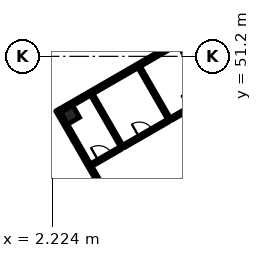
"""IFC4 building model, lengths in metres.
Left out: names, types, materials, properties, quantities, classifications, styles, units other than length and angle.
Written with IfcOpenShell. Run it as: python <this file> out.ifc"""

import sys

from ifc_helpers import new_model, si_unit, direction, frame, frame_2d, origin, origin_2d, place, context, subcontext, project, spatial, rectangle, extrude, element, fill, save


model = new_model("IFC4")
c1 = context("Model", 3, precision=1e-05, world=origin(), true_north=direction((0.0, 1.0)))
c2 = subcontext(c1, "Body", "Model", "MODEL_VIEW")
j1 = project(units=[si_unit("LENGTHUNIT", "METRE"), si_unit("PLANEANGLEUNIT", "RADIAN")], contexts=[c1])
p1 = place(None, origin())
s1 = spatial("IfcSite", under=j1, at=p1, CompositionType="ELEMENT")
p2 = place(p1, origin())
s2 = spatial("IfcBuilding", under=s1, at=p2, CompositionType="ELEMENT")
p3 = place(p2, frame((0.0, 0.0, 16.2)))
s3 = spatial("IfcBuildingStorey", under=s2, at=p3, CompositionType="ELEMENT", Elevation=16.2)
for number, where, z_axis, x_axis in (
    (1, (3.41, 47.349, 0.0), (0.0, 0.0, 1.0), (-0.5, 0.866, 0.0)),
    (2, (11.118, 51.799, 0.0), (0.0, 0.0, 1.0), (-0.5, 0.866, 0.0)),
):
    element("IfcColumn", number, at=place(p3, frame(where, z_axis=z_axis, x_axis=x_axis)), inside=s3, PredefinedType="COLUMN", context=c2, shape_type="SweptSolid", body=[
        extrude(rectangle(XDim=0.9, YDim=0.9, at=origin_2d()), origin(), (0.0, 0.0, 1.0), 5.4),
    ])
p4 = place(p3, frame((6.875, 40.198, 0.0), z_axis=(0.0, 0.0, 1.0), x_axis=(-0.499999331568, 0.866025789703, 0.0)))
e3 = element("IfcWall", 3, at=p4, inside=s3, PredefinedType="SOLIDWALL", context=c2, shape_type="SweptSolid", body=[
    extrude(rectangle(XDim=8.625, YDim=0.25, at=frame_2d((4.312, 0.0))), origin(), (0.0, 0.0, 1.0), 5.0),
])
p5 = place(p3, frame((2.733, 47.622, 0.0), z_axis=(0.0, 0.0, 1.0), x_axis=(0.866025598446, 0.499999662836, 0.0)))
e4 = element("IfcWall", 4, at=p5, inside=s3, PredefinedType="SOLIDWALL", context=c2, shape_type="SweptSolid", body=[
    extrude(rectangle(XDim=18.5, YDim=0.25, at=frame_2d((9.25, 0.0))), origin(), (0.0, 0.0, 1.0), 5.0),
])
for number, where, z_axis, x_axis in (
    (5, (6.831, 45.224, 0.0), (0.0, 0.0, 1.0), (-0.5, 0.866, 0.0)),
    (6, (9.949, 47.024, 0.0), (0.0, 0.0, 1.0), (-0.5, 0.866, 0.0)),
):
    element("IfcWall", number, at=place(p3, frame(where, z_axis=z_axis, x_axis=x_axis)), inside=s3, PredefinedType="PARTITIONING", context=c2, shape_type="SweptSolid", body=[
        extrude(rectangle(XDim=4.0, YDim=0.2, at=frame_2d((2.0, 0.0))), origin(), (0.0, 0.0, 1.0), 4.1),
    ])
p6 = place(p3, frame((4.796, 44.049, 0.0), z_axis=(0.0, 0.0, 1.0), x_axis=(0.866017533419, 0.500013631625, 0.0)))
e7 = element("IfcWall", 7, at=p6, inside=s3, PredefinedType="PARTITIONING", context=c2, shape_type="SweptSolid", body=[
    extrude(rectangle(XDim=2.25, YDim=0.2, at=frame_2d((1.125, 0.0))), origin(), (0.0, 0.0, 1.0), 4.1),
])
p7 = place(p6, frame((0.55, 0.0, 0.0)))
e8 = element("IfcOpeningElement", 8, at=p7, cuts=e7, PredefinedType="OPENING", context=c2, shape_type="SweptSolid", body=[
    extrude(rectangle(XDim=1.0, YDim=2.1, at=frame_2d((0.5, 1.05))), frame((0.0, 0.11, 0.0), z_axis=(0.0, -1.0, 0.0), x_axis=(1.0, 0.0, 0.0)), (0.0, 0.0, 1.0), 0.22),
])
p8 = place(p3, frame((6.917, 45.274, 0.0), z_axis=(0.0, 0.0, 1.0), x_axis=(0.866038511948, 0.499977295307, 0.0)))
e9 = element("IfcWall", 9, at=p8, inside=s3, PredefinedType="PARTITIONING", context=c2, shape_type="SweptSolid", body=[
    extrude(rectangle(XDim=3.4, YDim=0.2, at=frame_2d((1.7, 0.0))), origin(), (0.0, 0.0, 1.0), 4.1),
])
p9 = place(p8, frame((1.2, 0.0, 0.0)))
e10 = element("IfcOpeningElement", 10, at=p9, cuts=e9, PredefinedType="OPENING", context=c2, shape_type="SweptSolid", body=[
    extrude(rectangle(XDim=1.0, YDim=2.1, at=frame_2d((0.5, 1.05))), frame((0.0, 0.11, 0.0), z_axis=(0.0, -1.0, 0.0), x_axis=(1.0, 0.0, 0.0)), (0.0, 0.0, 1.0), 0.22),
])
p10 = place(p3, frame((10.035, 47.074, 0.0), z_axis=(0.0, 0.0, 1.0), x_axis=(0.866022959057, 0.500004234368, 0.0)))
e11 = element("IfcWall", 11, at=p10, inside=s3, PredefinedType="PARTITIONING", context=c2, shape_type="SweptSolid", body=[
    extrude(rectangle(XDim=3.75, YDim=0.2, at=frame_2d((1.875, 0.0))), origin(), (0.0, 0.0, 1.0), 4.1),
])
p11 = place(p10, frame((1.375, 0.0, 0.0)))
e12 = element("IfcOpeningElement", 12, at=p11, cuts=e11, PredefinedType="OPENING", context=c2, shape_type="SweptSolid", body=[
    extrude(rectangle(XDim=1.0, YDim=2.1, at=frame_2d((0.5, 1.05))), frame((0.0, 0.11, 0.0), z_axis=(0.0, -1.0, 0.0), x_axis=(1.0, 0.0, 0.0)), (0.0, 0.0, 1.0), 0.22),
])
p12 = place(p3, frame((6.983, 40.26, 0.0), z_axis=(0.0, 0.0, 1.0), x_axis=(0.866024244032, 0.500002008745, 0.0)))
e13 = element("IfcWall", 13, at=p12, inside=s3, PredefinedType="PARTITIONING", context=c2, shape_type="SweptSolid", body=[
    extrude(rectangle(XDim=47.5, YDim=0.2, at=frame_2d((23.75, 0.0))), origin(), (0.0, 0.0, 1.0), 4.1),
])
p13 = place(p7, origin())
e14 = element("IfcDoor", 14, at=p13, inside=s3, OperationType="SINGLE_SWING_LEFT", PredefinedType="DOOR", context=c2, shape_type="SweptSolid", body=[
    extrude(rectangle(XDim=1.0, YDim=2.1, at=frame_2d((0.5, 1.05))), frame((0.0, 0.025, 0.0), z_axis=(0.0, -1.0, 0.0), x_axis=(1.0, 0.0, 0.0)), (0.0, 0.0, 1.0), 0.05),
])
fill(e8, e14)
p14 = place(p9, origin())
e15 = element("IfcDoor", 15, at=p14, inside=s3, OperationType="SINGLE_SWING_LEFT", PredefinedType="DOOR", context=c2, shape_type="SweptSolid", body=[
    extrude(rectangle(XDim=1.0, YDim=2.1, at=frame_2d((0.5, 1.05))), frame((0.0, 0.025, 0.0), z_axis=(0.0, -1.0, 0.0), x_axis=(1.0, 0.0, 0.0)), (0.0, 0.0, 1.0), 0.05),
])
fill(e10, e15)
save(model, sys.argv[1])
